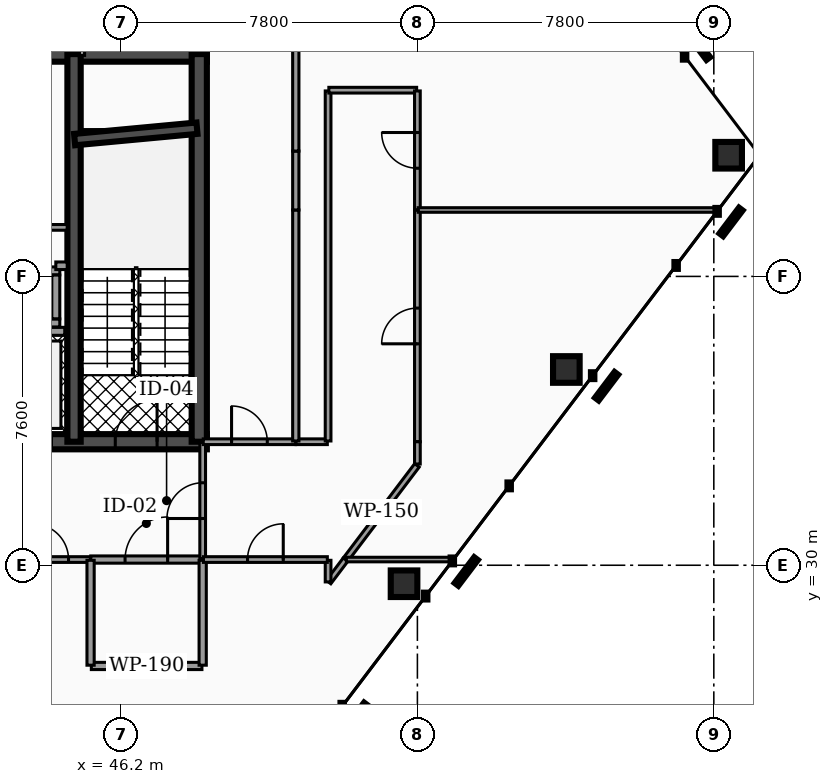
"""IFC4 building model, lengths in metres.
Left out: names, types, materials, properties, quantities, classifications, styles, units other than length and angle.
Written with IfcOpenShell. Run it as: python <this file> out.ifc"""

import sys

from ifc_helpers import new_model, si_unit, direction, frame, frame_2d, origin, origin_2d, place, context, subcontext, project, spatial, rectangle, hollow_rectangle, extrude, element, fill, save


model = new_model("IFC4")
c1 = context("Model", 3, precision=1e-05, world=origin(), true_north=direction((0.0, 1.0)))
c2 = subcontext(c1, "Body", "Model", "MODEL_VIEW")
j1 = project(units=[si_unit("LENGTHUNIT", "METRE"), si_unit("PLANEANGLEUNIT", "RADIAN")], contexts=[c1])
p1 = place(None, origin())
s1 = spatial("IfcSite", under=j1, at=p1, CompositionType="ELEMENT")
p2 = place(p1, origin())
s2 = spatial("IfcBuilding", under=s1, at=p2, CompositionType="ELEMENT")
p3 = place(p2, frame((0.0, 0.0, 190.74)))
s3 = spatial("IfcBuildingStorey", under=s2, at=p3, CompositionType="ELEMENT", Elevation=190.74)
p4 = place(p3, frame((28.4, 43.45, 0.0), z_axis=(0.0, 0.0, 1.0), x_axis=(1.0, 0.0, 0.0)))
e1 = element("IfcWall", 1, at=p4, inside=s3, PredefinedType="SHEAR", context=c2, shape_type="SweptSolid", body=[
    extrude(rectangle(XDim=20.06, YDim=0.4, at=frame_2d((10.03, 0.0))), origin(), (0.0, 0.0, 1.0), 3.39),
])
p5 = place(p3, frame((28.4, 33.25, 0.0), z_axis=(0.0, 0.0, 1.0), x_axis=(1.0, 0.0, 0.0)))
e2 = element("IfcWall", 2, at=p5, inside=s3, PredefinedType="SHEAR", context=c2, shape_type="SweptSolid", body=[
    extrude(rectangle(XDim=20.06, YDim=0.4, at=frame_2d((10.03, 0.0))), origin(), (0.0, 0.0, 1.0), 3.39),
])
p6 = place(p5, frame((4.03, 0.0, 0.0)))
e3 = element("IfcOpeningElement", 3, at=p6, cuts=e2, PredefinedType="OPENING", context=c2, shape_type="SweptSolid", body=[
    extrude(rectangle(XDim=1.1, YDim=2.15, at=frame_2d((0.55, 1.075))), frame((0.0, 0.21, 0.0), z_axis=(0.0, -1.0, 0.0), x_axis=(1.0, 0.0, 0.0)), (0.0, 0.0, 1.0), 0.42),
])
p7 = place(p5, frame((14.87, 0.0, 0.0)))
e4 = element("IfcOpeningElement", 4, at=p7, cuts=e2, PredefinedType="OPENING", context=c2, shape_type="SweptSolid", body=[
    extrude(rectangle(XDim=1.1, YDim=2.15, at=frame_2d((0.55, 1.075))), frame((0.0, 0.21, 0.0), z_axis=(0.0, -1.0, 0.0), x_axis=(1.0, 0.0, 0.0)), (0.0, 0.0, 1.0), 0.42),
])
p8 = place(p5, frame((5.95, 0.0, 0.0)))
e5 = element("IfcOpeningElement", 5, at=p8, cuts=e2, PredefinedType="OPENING", context=c2, shape_type="SweptSolid", body=[
    extrude(rectangle(XDim=1.0, YDim=2.1, at=frame_2d((0.5, 1.05))), frame((0.0, 0.21, 0.0), z_axis=(0.0, -1.0, 0.0), x_axis=(1.0, 0.0, 0.0)), (0.0, 0.0, 1.0), 0.42),
])
p9 = place(p5, frame((7.65, 0.0, 0.0)))
e6 = element("IfcOpeningElement", 6, at=p9, cuts=e2, PredefinedType="OPENING", context=c2, shape_type="SweptSolid", body=[
    extrude(rectangle(XDim=1.0, YDim=2.1, at=frame_2d((0.5, 1.05))), frame((0.0, 0.21, 0.0), z_axis=(0.0, -1.0, 0.0), x_axis=(1.0, 0.0, 0.0)), (0.0, 0.0, 1.0), 0.42),
])
p10 = place(p5, frame((1.31, 0.0, 0.0)))
e7 = element("IfcOpeningElement", 7, at=p10, cuts=e2, PredefinedType="OPENING", context=c2, shape_type="SweptSolid", body=[
    extrude(rectangle(XDim=1.1, YDim=2.2, at=frame_2d((0.55, 1.1))), frame((0.0, 0.21, 0.0), z_axis=(0.0, -1.0, 0.0), x_axis=(1.0, 0.0, 0.0)), (0.0, 0.0, 1.0), 0.42),
])
p11 = place(p5, frame((9.44, 0.0, 0.0)))
e8 = element("IfcOpeningElement", 8, at=p11, cuts=e2, PredefinedType="OPENING", context=c2, shape_type="SweptSolid", body=[
    extrude(rectangle(XDim=1.12, YDim=2.05, at=frame_2d((0.56, 1.025))), frame((0.0, 0.21, 0.0), z_axis=(0.0, -1.0, 0.0), x_axis=(1.0, 0.0, 0.0)), (0.0, 0.0, 1.0), 0.42),
])
p12 = place(p5, frame((17.65, 0.0, 0.0)))
e9 = element("IfcOpeningElement", 9, at=p12, cuts=e2, PredefinedType="OPENING", context=c2, shape_type="SweptSolid", body=[
    extrude(rectangle(XDim=1.1, YDim=2.2, at=frame_2d((0.55, 1.1))), frame((0.0, 0.21, 0.0), z_axis=(0.0, -1.0, 0.0), x_axis=(1.0, 0.0, 0.0)), (0.0, 0.0, 1.0), 0.42),
])
p13 = place(p3, frame((44.965, 33.25, 0.0), z_axis=(0.0, 0.0, 1.0), x_axis=(0.0, 1.0, 0.0)))
e10 = element("IfcWall", 10, at=p13, inside=s3, PredefinedType="SHEAR", context=c2, shape_type="SweptSolid", body=[
    extrude(rectangle(XDim=10.2, YDim=0.35, at=frame_2d((5.1, 0.0))), origin(), (0.0, 0.0, 1.0), 3.39),
])
p14 = place(p3, frame((48.26, 33.25, 0.0), z_axis=(0.0, 0.0, 1.0), x_axis=(0.0, 1.0, 0.0)))
e11 = element("IfcWall", 11, at=p14, inside=s3, PredefinedType="SHEAR", context=c2, shape_type="SweptSolid", body=[
    extrude(rectangle(XDim=10.2, YDim=0.4, at=frame_2d((5.1, 0.0))), origin(), (0.0, 0.0, 1.0), 3.39),
])
p15 = place(p3, frame((44.98, 41.2, 0.0), z_axis=(0.0, 0.0, 1.0), x_axis=(0.995686468965, 0.09278176286, 0.0)))
e12 = element("IfcWall", 12, at=p15, inside=s3, PredefinedType="SHEAR", context=c2, shape_type="SweptSolid", body=[
    extrude(rectangle(XDim=3.234, YDim=0.3, at=frame_2d((1.617, 0.0))), origin(), (0.0, 0.0, 1.0), 3.39),
])
p16 = place(p3, frame((53.649, 29.514, 0.0), z_axis=(-0.0521952381, 0.059231184914, 0.996878790954), x_axis=(-0.75026232765, -0.661140257214, 0.0)))
e13 = element("IfcColumn", 13, at=p16, inside=s3, PredefinedType="COLUMN", context=c2, shape_type="SweptSolid", body=[
    extrude(hollow_rectangle(XDim=0.7, YDim=0.7, WallThickness=0.035, at=origin_2d()), origin(), (0.0, 0.0, 1.0), 3.4),
])
p17 = place(p3, frame((57.919, 35.151, 0.0), z_axis=(-0.043781484286, 0.070265693633, 0.996567064443), x_axis=(-0.848728060466, -0.528829537165, 0.0)))
e14 = element("IfcColumn", 14, at=p17, inside=s3, PredefinedType="COLUMN", context=c2, shape_type="SweptSolid", body=[
    extrude(hollow_rectangle(XDim=0.7, YDim=0.7, WallThickness=0.035, at=origin_2d()), origin(), (0.0, 0.0, 1.0), 3.402),
])
p18 = place(p3, frame((62.19, 40.788, 0.0), z_axis=(-0.035438037838, 0.081206191968, 0.996067116142), x_axis=(-0.916528585644, -0.399969188435, 0.0)))
e15 = element("IfcColumn", 15, at=p18, inside=s3, PredefinedType="COLUMN", context=c2, shape_type="SweptSolid", body=[
    extrude(hollow_rectangle(XDim=0.7, YDim=0.7, WallThickness=0.035, at=origin_2d()), origin(), (0.0, 0.0, 1.0), 3.403),
])
p19 = place(p3, frame((42.92, 36.155, 0.0), z_axis=(0.0, 0.0, 1.0), x_axis=(1.0, 0.0, 0.0)))
e16 = element("IfcWall", 16, at=p19, inside=s3, PredefinedType="SOLIDWALL", context=c2, shape_type="SweptSolid", body=[
    extrude(rectangle(XDim=1.8, YDim=0.21, at=frame_2d((0.9, 0.0))), origin(), (0.0, 0.0, 1.0), 3.39),
])
for number, where, z_axis, x_axis in (
    (17, (42.99, 36.375, 0.0), (0.0, 0.0, 1.0), (1.0, 0.0, 0.0)),
    (18, (42.99, 37.745, 0.0), (0.0, 0.0, 1.0), (1.0, 0.0, 0.0)),
):
    element("IfcWall", number, at=place(p3, frame(where, z_axis=z_axis, x_axis=x_axis)), inside=s3, PredefinedType="SOLIDWALL", context=c2, shape_type="SweptSolid", body=[
        extrude(rectangle(XDim=1.6, YDim=0.21, at=frame_2d((0.8, 0.0))), origin(), (0.0, 0.0, 1.0), 3.39),
    ])
p20 = place(p3, frame((44.485, 36.485, 0.0), z_axis=(0.0, 0.0, 1.0), x_axis=(0.0, 1.0, 0.0)))
e19 = element("IfcWall", 19, at=p20, inside=s3, PredefinedType="SOLIDWALL", context=c2, shape_type="SweptSolid", body=[
    extrude(rectangle(XDim=1.15, YDim=0.21, at=frame_2d((0.575, 0.0))), origin(), (0.0, 0.0, 1.0), 3.39),
])
p21 = place(p3, frame((42.005, 38.89, 0.0), z_axis=(0.0, 0.0, 1.0), x_axis=(1.0, 0.0, 0.0)))
e20 = element("IfcWall", 20, at=p21, inside=s3, PredefinedType="PARTITIONING", context=c2, shape_type="SweptSolid", body=[
    extrude(rectangle(XDim=2.78, YDim=0.15, at=frame_2d((1.39, 0.0))), origin(), (0.0, 0.0, 1.0), 2.347),
])
p22 = place(p21, frame((0.92, 0.0, 0.0)))
e21 = element("IfcOpeningElement", 21, at=p22, cuts=e20, PredefinedType="OPENING", context=c2, shape_type="SweptSolid", body=[
    extrude(rectangle(XDim=0.94, YDim=2.05, at=frame_2d((0.47, 1.025))), frame((0.0, 0.085, 0.0), z_axis=(0.0, -1.0, 0.0), x_axis=(1.0, 0.0, 0.0)), (0.0, 0.0, 1.0), 0.17),
])
p23 = place(p3, frame((44.485, 37.88, 0.0), z_axis=(0.0, 0.0, 1.0), x_axis=(1.0, 0.0, 0.0)))
e22 = element("IfcWall", 22, at=p23, inside=s3, PredefinedType="PARTITIONING", context=c2, shape_type="SweptSolid", body=[
    extrude(rectangle(XDim=0.3, YDim=0.2, at=frame_2d((0.15, 0.0))), origin(), (0.0, 0.0, 1.0), 2.347),
])
p24 = place(p3, frame((45.405, 30.15, 0.0), z_axis=(0.0, 0.0, 1.0), x_axis=(1.0, 0.0, 0.0)))
e23 = element("IfcWall", 23, at=p24, inside=s3, PredefinedType="PARTITIONING", context=c2, shape_type="SweptSolid", body=[
    extrude(rectangle(XDim=2.925, YDim=0.19, at=frame_2d((1.462, 0.0))), origin(), (0.0, 0.0, 1.0), 2.347),
])
p25 = place(p24, frame((0.903, 0.0, 0.0)))
e24 = element("IfcOpeningElement", 24, at=p25, cuts=e23, PredefinedType="OPENING", context=c2, shape_type="SweptSolid", body=[
    extrude(rectangle(XDim=1.12, YDim=2.05, at=frame_2d((0.56, 1.025))), frame((0.0, 0.105, 0.0), z_axis=(0.0, -1.0, 0.0), x_axis=(1.0, 0.0, 0.0)), (0.0, 0.0, 1.0), 0.21),
])
p26 = place(p3, frame((48.35, 30.17, 0.0), z_axis=(0.0, 0.0, 1.0), x_axis=(0.0, 1.0, 0.0)))
e25 = element("IfcWall", 25, at=p26, inside=s3, PredefinedType="PARTITIONING", context=c2, shape_type="SweptSolid", body=[
    extrude(rectangle(XDim=3.06, YDim=0.15, at=frame_2d((1.53, 0.0))), origin(), (0.0, 0.0, 1.0), 2.347),
])
p27 = place(p26, frame((1.06, 0.0, 0.0)))
e26 = element("IfcOpeningElement", 26, at=p27, cuts=e25, PredefinedType="OPENING", context=c2, shape_type="SweptSolid", body=[
    extrude(rectangle(XDim=0.94, YDim=2.05, at=frame_2d((0.47, 1.025))), frame((0.0, 0.085, 0.0), z_axis=(0.0, -1.0, 0.0), x_axis=(1.0, 0.0, 0.0)), (0.0, 0.0, 1.0), 0.17),
])
p28 = place(p3, frame((43.305, 30.15, 0.0), z_axis=(0.0, 0.0, 1.0), x_axis=(1.0, 0.0, 0.0)))
e27 = element("IfcWall", 27, at=p28, inside=s3, PredefinedType="PARTITIONING", context=c2, shape_type="SweptSolid", body=[
    extrude(rectangle(XDim=2.09, YDim=0.15, at=frame_2d((1.045, 0.0))), origin(), (0.0, 0.0, 1.0), 2.347),
])
p29 = place(p28, frame((0.575, 0.0, 0.0)))
e28 = element("IfcOpeningElement", 28, at=p29, cuts=e27, PredefinedType="OPENING", context=c2, shape_type="SweptSolid", body=[
    extrude(rectangle(XDim=0.94, YDim=2.05, at=frame_2d((0.47, 1.025))), frame((0.0, 0.085, 0.0), z_axis=(0.0, -1.0, 0.0), x_axis=(1.0, 0.0, 0.0)), (0.0, 0.0, 1.0), 0.17),
])
p30 = place(p3, frame((45.42, 27.35, 0.0), z_axis=(0.0, 0.0, 1.0), x_axis=(1.0, 0.0, 0.0)))
e29 = element("IfcWall", 29, at=p30, inside=s3, PredefinedType="PARTITIONING", context=c2, shape_type="SweptSolid", body=[
    extrude(rectangle(XDim=2.91, YDim=0.19, at=frame_2d((1.455, 0.0))), origin(), (0.0, 0.0, 1.0), 2.347),
])
for number, where, z_axis, x_axis in (
    (30, (45.4, 27.37, 0.0), (0.0, 0.0, 1.0), (0.0, 1.0, 0.0)),
    (31, (48.35, 27.37, 0.0), (0.0, 0.0, 1.0), (0.0, 1.0, 0.0)),
):
    element("IfcWall", number, at=place(p3, frame(where, z_axis=z_axis, x_axis=x_axis)), inside=s3, PredefinedType="PARTITIONING", context=c2, shape_type="SweptSolid", body=[
        extrude(rectangle(XDim=2.76, YDim=0.19, at=frame_2d((1.38, 0.0))), origin(), (0.0, 0.0, 1.0), 2.347),
    ])
p31 = place(p3, frame((51.662, 29.557, 0.0), z_axis=(0.0, 0.0, 1.0), x_axis=(0.603572672845, 0.797307988543, 0.0)))
e32 = element("IfcWall", 32, at=p31, inside=s3, PredefinedType="PARTITIONING", context=c2, shape_type="SweptSolid", body=[
    extrude(rectangle(XDim=0.742, YDim=0.15, at=frame_2d((0.371, 0.0))), origin(), (0.0, 0.0, 1.0), 2.347),
])
p32 = place(p3, frame((51.65, 29.562, 0.0), z_axis=(0.0, 0.0, 1.0), x_axis=(0.0, 1.0, 0.0)))
e33 = element("IfcWall", 33, at=p32, inside=s3, PredefinedType="PARTITIONING", context=c2, shape_type="SweptSolid", body=[
    extrude(rectangle(XDim=0.568, YDim=0.15, at=frame_2d((0.284, 0.0))), origin(), (0.0, 0.0, 1.0), 2.347),
])
p33 = place(p3, frame((48.37, 30.15, 0.0), z_axis=(0.0, 0.0, 1.0), x_axis=(1.0, 0.0, 0.0)))
e34 = element("IfcWall", 34, at=p33, inside=s3, PredefinedType="PARTITIONING", context=c2, shape_type="SweptSolid", body=[
    extrude(rectangle(XDim=3.26, YDim=0.15, at=frame_2d((1.63, 0.0))), origin(), (0.0, 0.0, 1.0), 2.347),
])
p34 = place(p33, frame((1.16, 0.0, 0.0)))
e35 = element("IfcOpeningElement", 35, at=p34, cuts=e34, PredefinedType="OPENING", context=c2, shape_type="SweptSolid", body=[
    extrude(rectangle(XDim=0.94, YDim=2.05, at=frame_2d((0.47, 1.025))), frame((0.0, 0.085, 0.0), z_axis=(0.0, -1.0, 0.0), x_axis=(1.0, 0.0, 0.0)), (0.0, 0.0, 1.0), 0.17),
])
p35 = place(p3, frame((54.0, 33.25, 0.0), z_axis=(0.0, 0.0, 1.0), x_axis=(0.0, 1.0, 0.0)))
e36 = element("IfcWall", 36, at=p35, inside=s3, PredefinedType="PARTITIONING", context=c2, shape_type="SweptSolid", body=[
    extrude(rectangle(XDim=6.093, YDim=0.15, at=frame_2d((3.046, 0.0))), origin(), (0.0, 0.0, 1.0), 2.347),
])
p36 = place(p35, frame((2.576, 0.0, 0.0)))
e37 = element("IfcOpeningElement", 37, at=p36, cuts=e36, PredefinedType="OPENING", context=c2, shape_type="SweptSolid", body=[
    extrude(rectangle(XDim=0.94, YDim=2.05, at=frame_2d((0.47, 1.025))), frame((0.0, 0.085, 0.0), z_axis=(0.0, -1.0, 0.0), x_axis=(1.0, 0.0, 0.0)), (0.0, 0.0, 1.0), 0.17),
])
p37 = place(p3, frame((54.0, 32.664, 0.0), z_axis=(0.0, 0.0, 1.0), x_axis=(0.0, 1.0, 0.0)))
e38 = element("IfcWall", 38, at=p37, inside=s3, PredefinedType="PARTITIONING", context=c2, shape_type="SweptSolid", body=[
    extrude(rectangle(XDim=0.586, YDim=0.15, at=frame_2d((0.293, 0.0))), origin(), (0.0, 0.0, 1.0), 2.347),
])
p38 = place(p3, frame((52.114, 30.154, 0.0), z_axis=(0.0, 0.0, 1.0), x_axis=(0.603819819336, 0.797120835116, 0.0)))
e39 = element("IfcWall", 39, at=p38, inside=s3, PredefinedType="PARTITIONING", context=c2, shape_type="SweptSolid", body=[
    extrude(rectangle(XDim=3.103, YDim=0.15, at=frame_2d((1.552, 0.0))), origin(), (0.0, 0.0, 1.0), 2.347),
])
p39 = place(p3, frame((50.805, 33.25, 0.0), z_axis=(0.0, 0.0, 1.0), x_axis=(1.0, 0.0, 0.0)))
e40 = element("IfcWall", 40, at=p39, inside=s3, PredefinedType="PARTITIONING", context=c2, shape_type="SweptSolid", body=[
    extrude(rectangle(XDim=0.825, YDim=0.15, at=frame_2d((0.413, 0.0))), origin(), (0.0, 0.0, 1.0), 2.347),
])
p40 = place(p3, frame((51.65, 33.27, 0.0), z_axis=(0.0, 0.0, 1.0), x_axis=(0.0, 1.0, 0.0)))
e41 = element("IfcWall", 41, at=p40, inside=s3, PredefinedType="PARTITIONING", context=c2, shape_type="SweptSolid", body=[
    extrude(rectangle(XDim=9.21, YDim=0.15, at=frame_2d((4.605, 0.0))), origin(), (0.0, 0.0, 1.0), 2.347),
])
p41 = place(p3, frame((51.67, 42.5, 0.0), z_axis=(0.0, 0.0, 1.0), x_axis=(1.0, 0.0, 0.0)))
e42 = element("IfcWall", 42, at=p41, inside=s3, PredefinedType="PARTITIONING", context=c2, shape_type="SweptSolid", body=[
    extrude(rectangle(XDim=2.31, YDim=0.15, at=frame_2d((1.155, 0.0))), origin(), (0.0, 0.0, 1.0), 2.347),
])
p42 = place(p3, frame((54.0, 39.353, 0.0), z_axis=(0.0, 0.0, 1.0), x_axis=(0.0, 1.0, 0.0)))
e43 = element("IfcWall", 43, at=p42, inside=s3, PredefinedType="PARTITIONING", context=c2, shape_type="SweptSolid", body=[
    extrude(rectangle(XDim=3.127, YDim=0.15, at=frame_2d((1.563, 0.0))), origin(), (0.0, 0.0, 1.0), 2.347),
])
p43 = place(p42, frame((1.094, 0.0, 0.0)))
e44 = element("IfcOpeningElement", 44, at=p43, cuts=e43, PredefinedType="OPENING", context=c2, shape_type="SweptSolid", body=[
    extrude(rectangle(XDim=0.94, YDim=2.05, at=frame_2d((0.47, 1.025))), frame((0.0, 0.085, 0.0), z_axis=(0.0, -1.0, 0.0), x_axis=(1.0, 0.0, 0.0)), (0.0, 0.0, 1.0), 0.17),
])
p44 = place(p3, frame((48.365, 33.25, 0.0), z_axis=(0.0, 0.0, 1.0), x_axis=(1.0, 0.0, 0.0)))
e45 = element("IfcWall", 45, at=p44, inside=s3, PredefinedType="PARTITIONING", context=c2, shape_type="SweptSolid", body=[
    extrude(rectangle(XDim=2.43, YDim=0.15, at=frame_2d((1.215, 0.0))), origin(), (0.0, 0.0, 1.0), 2.347),
])
p45 = place(p44, frame((0.745, 0.0, 0.0)))
e46 = element("IfcOpeningElement", 46, at=p45, cuts=e45, PredefinedType="OPENING", context=c2, shape_type="SweptSolid", body=[
    extrude(rectangle(XDim=0.94, YDim=2.05, at=frame_2d((0.47, 1.025))), frame((0.0, 0.085, 0.0), z_axis=(0.0, -1.0, 0.0), x_axis=(1.0, 0.0, 0.0)), (0.0, 0.0, 1.0), 0.17),
])
p46 = place(p3, frame((52.131, 30.15, 0.0), z_axis=(0.0, 0.0, 1.0), x_axis=(1.0, 0.0, 0.0)))
e47 = element("IfcWall", 47, at=p46, inside=s3, PredefinedType="PARTITIONING", context=c2, shape_type="SweptSolid", body=[
    extrude(rectangle(XDim=2.8, YDim=0.12, at=frame_2d((1.4, 0.0))), origin(), (0.0, 0.0, 1.0), 2.347),
])
p47 = place(p3, frame((54.02, 39.348, 0.0), z_axis=(0.0, 0.0, 1.0), x_axis=(1.0, 0.0, 0.0)))
e48 = element("IfcWall", 48, at=p47, inside=s3, PredefinedType="PARTITIONING", context=c2, shape_type="SweptSolid", body=[
    extrude(rectangle(XDim=7.879, YDim=0.12, at=frame_2d((3.94, 0.0))), origin(), (0.0, 0.0, 1.0), 2.347),
])
p48 = place(p3, frame((50.8, 33.27, 0.0), z_axis=(0.0, 0.0, 1.0), x_axis=(0.0, 1.0, 0.0)))
e49 = element("IfcWall", 49, at=p48, inside=s3, PredefinedType="PARTITIONING", context=c2, shape_type="SweptSolid", body=[
    extrude(rectangle(XDim=6.078, YDim=0.165, at=frame_2d((3.039, 0.0))), origin(), (0.0, 0.0, 1.0), 2.347),
])
p49 = place(p3, frame((50.8, 39.348, 0.0), z_axis=(0.0, 0.0, 1.0), x_axis=(0.0, 1.0, 0.0)))
e50 = element("IfcWall", 50, at=p49, inside=s3, PredefinedType="PARTITIONING", context=c2, shape_type="SweptSolid", body=[
    extrude(rectangle(XDim=1.55, YDim=0.165, at=frame_2d((0.775, 0.0))), origin(), (0.0, 0.0, 1.0), 2.347),
])
p50 = place(p3, frame((50.8, 40.898, 0.0), z_axis=(0.0, 0.0, 1.0), x_axis=(0.0, 1.0, 0.0)))
e51 = element("IfcWall", 51, at=p50, inside=s3, PredefinedType="PARTITIONING", context=c2, shape_type="SweptSolid", body=[
    extrude(rectangle(XDim=5.478, YDim=0.165, at=frame_2d((2.739, 0.0))), origin(), (0.0, 0.0, 1.0), 2.347),
])
p51 = place(p3, frame((45.175, 43.415, 0.0), z_axis=(0.0, 0.0, 1.0), x_axis=(0.0, 1.0, 0.0)))
e52 = element("IfcWall", 52, at=p51, inside=s3, PredefinedType="PARTITIONING", context=c2, shape_type="SweptSolid", body=[
    extrude(rectangle(XDim=5.176, YDim=0.135, at=frame_2d((2.588, 0.0))), origin(), (0.0, 0.0, 1.0), 2.347),
])
p52 = place(p51, frame((2.158, 0.0, 0.0)))
e53 = element("IfcOpeningElement", 53, at=p52, cuts=e52, PredefinedType="OPENING", context=c2, shape_type="SweptSolid", body=[
    extrude(rectangle(XDim=0.86, YDim=2.05, at=frame_2d((0.43, 1.025))), frame((0.0, 0.077, 0.0), z_axis=(0.0, -1.0, 0.0), x_axis=(1.0, 0.0, 0.0)), (0.0, 0.0, 1.0), 0.155),
])
p53 = place(p12, origin())
e54 = element("IfcDoor", 54, at=p53, inside=s3, OperationType="SINGLE_SWING_RIGHT", PredefinedType="DOOR", context=c2, shape_type="SweptSolid", body=[
    extrude(rectangle(XDim=1.1, YDim=2.2, at=frame_2d((0.55, 1.1))), frame((0.0, 0.025, 0.0), z_axis=(0.0, -1.0, 0.0), x_axis=(1.0, 0.0, 0.0)), (0.0, 0.0, 1.0), 0.05),
])
fill(e9, e54)
p54 = place(p25, origin())
e55 = element("IfcDoor", 55, at=p54, inside=s3, OperationType="SINGLE_SWING_RIGHT", PredefinedType="DOOR", context=c2, shape_type="SweptSolid", body=[
    extrude(rectangle(XDim=1.12, YDim=2.05, at=frame_2d((0.56, 1.025))), frame((0.0, 0.025, 0.0), z_axis=(0.0, -1.0, 0.0), x_axis=(1.0, 0.0, 0.0)), (0.0, 0.0, 1.0), 0.05),
])
fill(e24, e55)
p55 = place(p27, origin())
e56 = element("IfcDoor", 56, at=p55, inside=s3, OperationType="SINGLE_SWING_LEFT", PredefinedType="DOOR", context=c2, shape_type="SweptSolid", body=[
    extrude(rectangle(XDim=0.94, YDim=2.05, at=frame_2d((0.47, 1.025))), frame((0.0, 0.025, 0.0), z_axis=(0.0, -1.0, 0.0), x_axis=(1.0, 0.0, 0.0)), (0.0, 0.0, 1.0), 0.05),
])
fill(e26, e56)
p56 = place(p29, origin())
e57 = element("IfcDoor", 57, at=p56, inside=s3, OperationType="SINGLE_SWING_LEFT", PredefinedType="DOOR", context=c2, shape_type="SweptSolid", body=[
    extrude(rectangle(XDim=0.94, YDim=2.05, at=frame_2d((0.47, 1.025))), frame((0.0, 0.025, 0.0), z_axis=(0.0, -1.0, 0.0), x_axis=(1.0, 0.0, 0.0)), (0.0, 0.0, 1.0), 0.05),
])
fill(e28, e57)
p57 = place(p34, origin())
e58 = element("IfcDoor", 58, at=p57, inside=s3, OperationType="SINGLE_SWING_RIGHT", PredefinedType="DOOR", context=c2, shape_type="SweptSolid", body=[
    extrude(rectangle(XDim=0.94, YDim=2.05, at=frame_2d((0.47, 1.025))), frame((0.0, 0.025, 0.0), z_axis=(0.0, -1.0, 0.0), x_axis=(1.0, 0.0, 0.0)), (0.0, 0.0, 1.0), 0.05),
])
fill(e35, e58)
p58 = place(p36, origin())
e59 = element("IfcDoor", 59, at=p58, inside=s3, OperationType="SINGLE_SWING_LEFT", PredefinedType="DOOR", context=c2, shape_type="SweptSolid", body=[
    extrude(rectangle(XDim=0.94, YDim=2.05, at=frame_2d((0.47, 1.025))), frame((0.0, 0.025, 0.0), z_axis=(0.0, -1.0, 0.0), x_axis=(1.0, 0.0, 0.0)), (0.0, 0.0, 1.0), 0.05),
])
fill(e37, e59)
p59 = place(p43, origin())
e60 = element("IfcDoor", 60, at=p59, inside=s3, OperationType="SINGLE_SWING_RIGHT", PredefinedType="DOOR", context=c2, shape_type="SweptSolid", body=[
    extrude(rectangle(XDim=0.94, YDim=2.05, at=frame_2d((0.47, 1.025))), frame((0.0, 0.025, 0.0), z_axis=(0.0, -1.0, 0.0), x_axis=(1.0, 0.0, 0.0)), (0.0, 0.0, 1.0), 0.05),
])
fill(e44, e60)
p60 = place(p45, origin())
e61 = element("IfcDoor", 61, at=p60, inside=s3, OperationType="SINGLE_SWING_LEFT", PredefinedType="DOOR", context=c2, shape_type="SweptSolid", body=[
    extrude(rectangle(XDim=0.94, YDim=2.05, at=frame_2d((0.47, 1.025))), frame((0.0, 0.025, 0.0), z_axis=(0.0, -1.0, 0.0), x_axis=(1.0, 0.0, 0.0)), (0.0, 0.0, 1.0), 0.05),
])
fill(e46, e61)
save(model, sys.argv[1])
